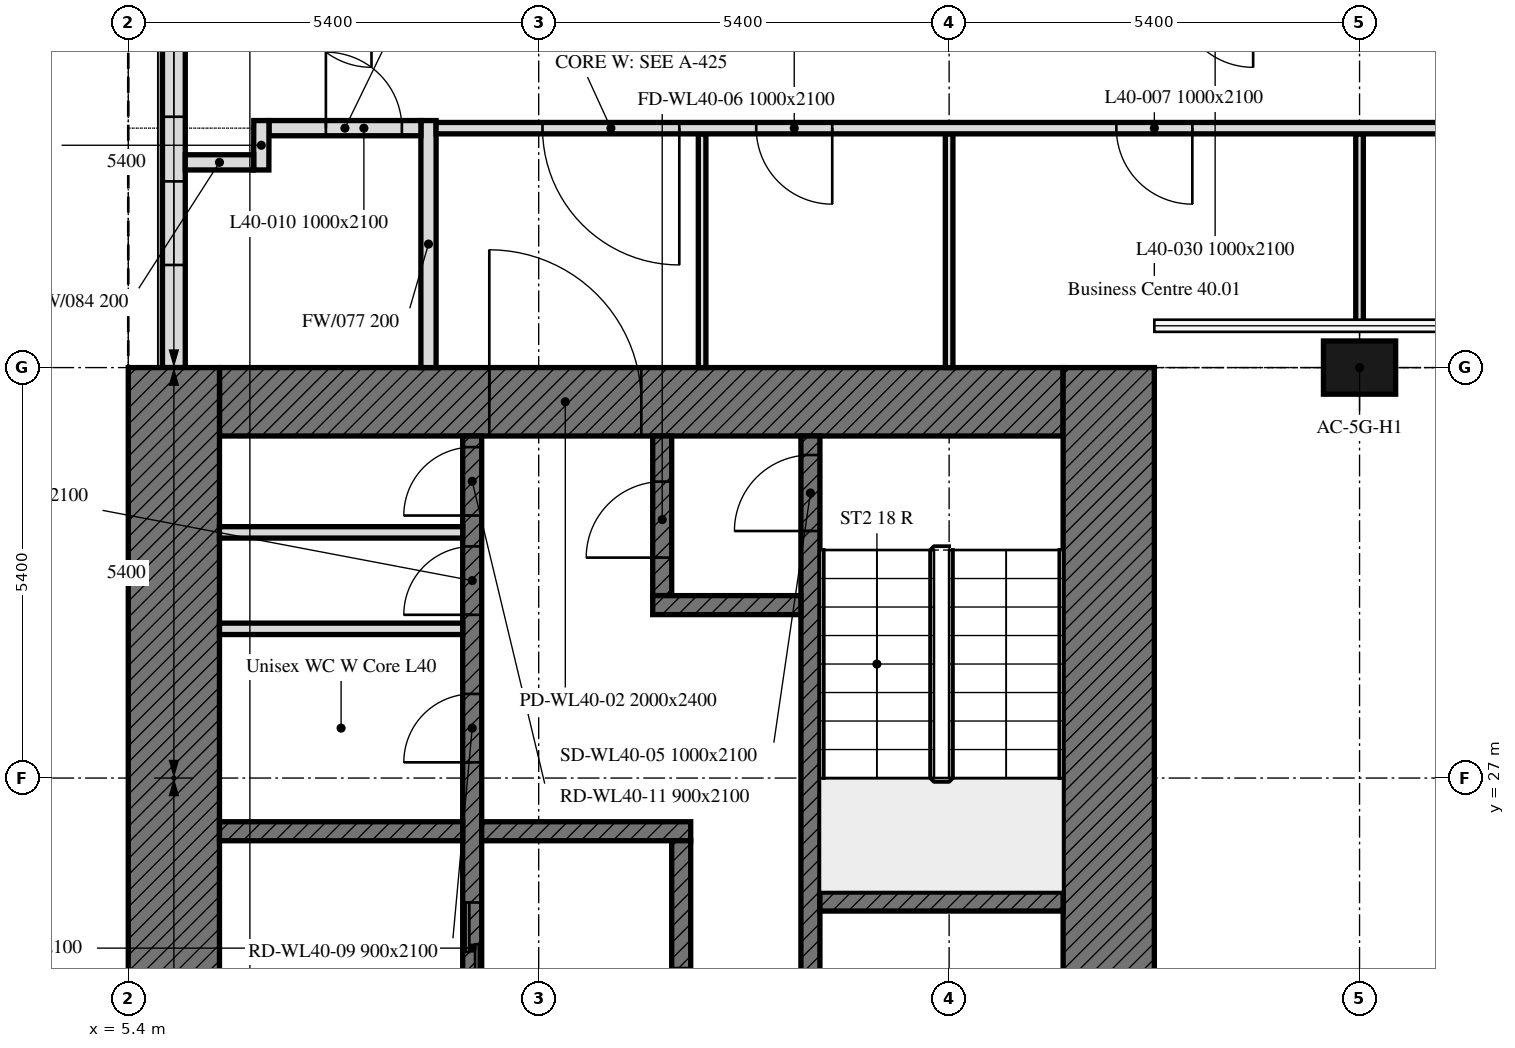
"""IFC4 building model, lengths in metres.
Left out: names, types, materials, properties, quantities, classifications, styles, units other than length and angle.
Written with IfcOpenShell. Run it as: python <this file> out.ifc"""

import sys

from ifc_helpers import new_model, si_unit, direction, frame, frame_2d, origin, origin_2d, place, context, subcontext, project, spatial, rectangle, extrude, element, fill, save


model = new_model("IFC4")
c1 = context("Model", 3, precision=1e-05, world=origin(), true_north=direction((0.0, 1.0)))
c2 = subcontext(c1, "Body", "Model", "MODEL_VIEW")
j1 = project(units=[si_unit("LENGTHUNIT", "METRE"), si_unit("PLANEANGLEUNIT", "RADIAN")], contexts=[c1])
p1 = place(None, origin())
s1 = spatial("IfcSite", under=j1, at=p1, CompositionType="ELEMENT")
p2 = place(p1, origin())
s2 = spatial("IfcBuilding", under=s1, at=p2, CompositionType="ELEMENT")
p3 = place(p2, frame((0.0, 0.0, 169.3)))
s3 = spatial("IfcBuildingStorey", under=s2, at=p3, CompositionType="ELEMENT", Elevation=169.3)
p4 = place(p3, frame((21.6, 32.4, 0.0), z_axis=(0.0, 0.0, 1.0), x_axis=(1.0, 0.0, 0.0)))
e1 = element("IfcColumn", 1, at=p4, inside=s3, PredefinedType="COLUMN", context=c2, shape_type="SweptSolid", body=[
    extrude(rectangle(XDim=0.95, YDim=0.7, at=origin_2d()), origin(), (0.0, 0.0, 1.0), 3.0),
])
p5 = place(p3, frame((6.0, 37.614, 0.0), z_axis=(0.0, 0.0, 1.0), x_axis=(0.0, -1.0, 0.0)))
e2 = element("IfcWall", 2, at=p5, inside=s3, PredefinedType="SOLIDWALL", context=c2, shape_type="SweptSolid", body=[
    extrude(rectangle(XDim=5.214, YDim=0.3, at=frame_2d((2.607, 0.0))), origin(), (0.0, 0.0, 1.0), 3.0),
])
p6 = place(p5, frame((0.814, 0.0, 0.9)))
e3 = element("IfcOpeningElement", 3, at=p6, cuts=e2, PredefinedType="OPENING", context=c2, shape_type="SweptSolid", body=[
    extrude(rectangle(XDim=1.1, YDim=1.7, at=frame_2d((0.55, 0.85))), frame((0.0, 0.16, 0.0), z_axis=(0.0, -1.0, 0.0), x_axis=(1.0, 0.0, 0.0)), (0.0, 0.0, 1.0), 0.32),
])
p7 = place(p5, frame((2.764, 0.0, 0.9)))
e4 = element("IfcOpeningElement", 4, at=p7, cuts=e2, PredefinedType="OPENING", context=c2, shape_type="SweptSolid", body=[
    extrude(rectangle(XDim=1.1, YDim=1.7, at=frame_2d((0.55, 0.85))), frame((0.0, 0.16, 0.0), z_axis=(0.0, -1.0, 0.0), x_axis=(1.0, 0.0, 0.0)), (0.0, 0.0, 1.0), 0.32),
])
p8 = place(p3, frame((6.6, 31.95, 0.0), z_axis=(0.0, 0.0, 1.0), x_axis=(1.0, 0.0, 0.0)))
e5 = element("IfcWall", 5, at=p8, inside=s3, PredefinedType="SOLIDWALL", context=c2, shape_type="SweptSolid", body=[
    extrude(rectangle(XDim=11.1, YDim=0.9, at=frame_2d((5.55, 0.0))), origin(), (0.0, 0.0, 1.0), 3.0),
])
p9 = place(p8, frame((3.55, 0.0, 0.0)))
e6 = element("IfcOpeningElement", 6, at=p9, cuts=e5, PredefinedType="OPENING", context=c2, shape_type="SweptSolid", body=[
    extrude(rectangle(XDim=2.0, YDim=2.4, at=frame_2d((1.0, 1.2))), frame((0.0, 0.45, 0.0), z_axis=(0.0, -1.0, 0.0), x_axis=(1.0, 0.0, 0.0)), (0.0, 0.0, 1.0), 0.9),
])
for number, where, z_axis, x_axis in (
    (7, (6.0, 16.2, 0.0), (0.0, 0.0, 1.0), (0.0, 1.0, 0.0)),
    (8, (18.3, 32.4, 0.0), (0.0, 0.0, 1.0), (0.0, -1.0, 0.0)),
):
    element("IfcWall", number, at=place(p3, frame(where, z_axis=z_axis, x_axis=x_axis)), inside=s3, PredefinedType="SOLIDWALL", context=c2, shape_type="SweptSolid", body=[
        extrude(rectangle(XDim=16.2, YDim=1.2, at=frame_2d((8.1, 0.0))), origin(), (0.0, 0.0, 1.0), 3.0),
    ])
p10 = place(p3, frame((9.925, 17.1, 0.0), z_axis=(0.0, 0.0, 1.0), x_axis=(0.0, 1.0, 0.0)))
e9 = element("IfcWall", 9, at=p10, inside=s3, PredefinedType="SOLIDWALL", context=c2, shape_type="SweptSolid", body=[
    extrude(rectangle(XDim=14.4, YDim=0.25, at=frame_2d((7.2, 0.0))), origin(), (0.0, 0.0, 1.0), 3.0),
])
p11 = place(p10, frame((4.6, 0.0, 0.0)))
e10 = element("IfcOpeningElement", 10, at=p11, cuts=e9, PredefinedType="OPENING", context=c2, shape_type="SweptSolid", body=[
    extrude(rectangle(XDim=1.0, YDim=2.1, at=frame_2d((0.5, 1.05))), frame((0.0, 0.125, 0.0), z_axis=(0.0, -1.0, 0.0), x_axis=(1.0, 0.0, 0.0)), (0.0, 0.0, 1.0), 0.25),
])
p12 = place(p10, frame((7.062, 0.0, 0.0)))
e11 = element("IfcOpeningElement", 11, at=p12, cuts=e9, PredefinedType="OPENING", context=c2, shape_type="SweptSolid", body=[
    extrude(rectangle(XDim=1.2, YDim=2.1, at=frame_2d((0.6, 1.05))), frame((0.0, 0.125, 0.0), z_axis=(0.0, -1.0, 0.0), x_axis=(1.0, 0.0, 0.0)), (0.0, 0.0, 1.0), 0.25),
])
p13 = place(p10, frame((10.106, 0.0, 0.0)))
e12 = element("IfcOpeningElement", 12, at=p13, cuts=e9, PredefinedType="OPENING", context=c2, shape_type="SweptSolid", body=[
    extrude(rectangle(XDim=0.9, YDim=2.1, at=frame_2d((0.45, 1.05))), frame((0.0, 0.125, 0.0), z_axis=(0.0, -1.0, 0.0), x_axis=(1.0, 0.0, 0.0)), (0.0, 0.0, 1.0), 0.25),
])
p14 = place(p10, frame((12.048, 0.0, 0.0)))
e13 = element("IfcOpeningElement", 13, at=p14, cuts=e9, PredefinedType="OPENING", context=c2, shape_type="SweptSolid", body=[
    extrude(rectangle(XDim=0.9, YDim=2.1, at=frame_2d((0.45, 1.05))), frame((0.0, 0.125, 0.0), z_axis=(0.0, -1.0, 0.0), x_axis=(1.0, 0.0, 0.0)), (0.0, 0.0, 1.0), 0.25),
])
p15 = place(p10, frame((13.354, 0.0, 0.0)))
e14 = element("IfcOpeningElement", 14, at=p15, cuts=e9, PredefinedType="OPENING", context=c2, shape_type="SweptSolid", body=[
    extrude(rectangle(XDim=0.9, YDim=2.1, at=frame_2d((0.45, 1.05))), frame((0.0, 0.125, 0.0), z_axis=(0.0, -1.0, 0.0), x_axis=(1.0, 0.0, 0.0)), (0.0, 0.0, 1.0), 0.25),
])
p16 = place(p3, frame((14.375, 17.1, 0.0), z_axis=(0.0, 0.0, 1.0), x_axis=(0.0, 1.0, 0.0)))
e15 = element("IfcWall", 15, at=p16, inside=s3, PredefinedType="SOLIDWALL", context=c2, shape_type="SweptSolid", body=[
    extrude(rectangle(XDim=14.4, YDim=0.25, at=frame_2d((7.2, 0.0))), origin(), (0.0, 0.0, 1.0), 3.0),
])
p17 = place(p16, frame((13.15, 0.0, 0.0)))
e16 = element("IfcOpeningElement", 16, at=p17, cuts=e15, PredefinedType="OPENING", context=c2, shape_type="SweptSolid", body=[
    extrude(rectangle(XDim=1.0, YDim=2.1, at=frame_2d((0.5, 1.05))), frame((0.0, 0.125, 0.0), z_axis=(0.0, -1.0, 0.0), x_axis=(1.0, 0.0, 0.0)), (0.0, 0.0, 1.0), 0.25),
])
p18 = place(p16, frame((0.6, 0.0, 0.0)))
e17 = element("IfcOpeningElement", 17, at=p18, cuts=e15, PredefinedType="OPENING", context=c2, shape_type="SweptSolid", body=[
    extrude(rectangle(XDim=1.1, YDim=2.1, at=frame_2d((0.55, 1.05))), frame((0.0, 0.125, 0.0), z_axis=(0.0, -1.0, 0.0), x_axis=(1.0, 0.0, 0.0)), (0.0, 0.0, 1.0), 0.25),
])
p19 = place(p16, frame((3.25, 0.0, 0.0)))
e18 = element("IfcOpeningElement", 18, at=p19, cuts=e15, PredefinedType="OPENING", context=c2, shape_type="SweptSolid", body=[
    extrude(rectangle(XDim=0.9, YDim=2.1, at=frame_2d((0.45, 1.05))), frame((0.0, 0.125, 0.0), z_axis=(0.0, -1.0, 0.0), x_axis=(1.0, 0.0, 0.0)), (0.0, 0.0, 1.0), 0.25),
])
for number, where, z_axis, x_axis in (
    (19, (14.5, 25.375, 0.0), (0.0, 0.0, 1.0), (1.0, 0.0, 0.0)),
    (20, (6.6, 26.3, 0.0), (0.0, 0.0, 1.0), (1.0, 0.0, 0.0)),
):
    element("IfcWall", number, at=place(p3, frame(where, z_axis=z_axis, x_axis=x_axis)), inside=s3, PredefinedType="SOLIDWALL", context=c2, shape_type="SweptSolid", body=[
        extrude(rectangle(XDim=3.2, YDim=0.25, at=frame_2d((1.6, 0.0))), origin(), (0.0, 0.0, 1.0), 3.0),
    ])
p20 = place(p3, frame((10.05, 26.3, 0.0), z_axis=(0.0, 0.0, 1.0), x_axis=(1.0, 0.0, 0.0)))
e21 = element("IfcWall", 21, at=p20, inside=s3, PredefinedType="SOLIDWALL", context=c2, shape_type="SweptSolid", body=[
    extrude(rectangle(XDim=2.75, YDim=0.25, at=frame_2d((1.375, 0.0))), origin(), (0.0, 0.0, 1.0), 3.0),
])
p21 = place(p3, frame((12.425, 29.4, 0.0), z_axis=(0.0, 0.0, 1.0), x_axis=(0.0, 1.0, 0.0)))
e22 = element("IfcWall", 22, at=p21, inside=s3, PredefinedType="SOLIDWALL", context=c2, shape_type="SweptSolid", body=[
    extrude(rectangle(XDim=2.1, YDim=0.25, at=frame_2d((1.05, 0.0))), origin(), (0.0, 0.0, 1.0), 3.0),
])
p22 = place(p21, frame((0.5, 0.0, 0.0)))
e23 = element("IfcOpeningElement", 23, at=p22, cuts=e22, PredefinedType="OPENING", context=c2, shape_type="SweptSolid", body=[
    extrude(rectangle(XDim=1.0, YDim=2.1, at=frame_2d((0.5, 1.05))), frame((0.0, 0.125, 0.0), z_axis=(0.0, -1.0, 0.0), x_axis=(1.0, 0.0, 0.0)), (0.0, 0.0, 1.0), 0.25),
])
p23 = place(p3, frame((12.3, 29.275, 0.0), z_axis=(0.0, 0.0, 1.0), x_axis=(1.0, 0.0, 0.0)))
e24 = element("IfcWall", 24, at=p23, inside=s3, PredefinedType="SOLIDWALL", context=c2, shape_type="SweptSolid", body=[
    extrude(rectangle(XDim=1.95, YDim=0.25, at=frame_2d((0.975, 0.0))), origin(), (0.0, 0.0, 1.0), 3.0),
])
p24 = place(p3, frame((12.675, 20.55, 0.0), z_axis=(0.0, 0.0, 1.0), x_axis=(0.0, 1.0, 0.0)))
e25 = element("IfcWall", 25, at=p24, inside=s3, PredefinedType="SOLIDWALL", context=c2, shape_type="SweptSolid", body=[
    extrude(rectangle(XDim=5.625, YDim=0.25, at=frame_2d((2.812, 0.0))), origin(), (0.0, 0.0, 1.0), 3.0),
])
p25 = place(p24, frame((2.95, 0.0, 0.0)))
e26 = element("IfcOpeningElement", 26, at=p25, cuts=e25, PredefinedType="OPENING", context=c2, shape_type="SweptSolid", body=[
    extrude(rectangle(XDim=1.0, YDim=2.1, at=frame_2d((0.5, 1.05))), frame((0.0, 0.125, 0.0), z_axis=(0.0, -1.0, 0.0), x_axis=(1.0, 0.0, 0.0)), (0.0, 0.0, 1.0), 0.25),
])
for number, where, z_axis, x_axis in (
    (27, (6.6, 28.963, 0.0), (0.0, 0.0, 1.0), (1.0, 0.0, 0.0)),
    (28, (6.6, 30.232, 0.0), (0.0, 0.0, 1.0), (1.0, 0.0, 0.0)),
):
    element("IfcWall", number, at=place(p3, frame(where, z_axis=z_axis, x_axis=x_axis)), inside=s3, PredefinedType="PARTITIONING", context=c2, shape_type="SweptSolid", body=[
        extrude(rectangle(XDim=3.2, YDim=0.15, at=frame_2d((1.6, 0.0))), origin(), (0.0, 0.0, 1.0), 3.0),
    ])
p26 = place(p3, frame((16.2, 35.475, 0.0), z_axis=(0.0, 0.0, 1.0), x_axis=(0.0, -1.0, 0.0)))
e29 = element("IfcWall", 29, at=p26, inside=s3, PredefinedType="PARTITIONING", context=c2, shape_type="SweptSolid", body=[
    extrude(rectangle(XDim=3.075, YDim=0.1, at=frame_2d((1.538, 0.0))), origin(), (0.0, 0.0, 1.0), 3.0),
])
p27 = place(p3, frame((21.6, 32.895, 0.0), z_axis=(0.0, 0.0, 1.0), x_axis=(0.0, 1.0, 0.0)))
e30 = element("IfcWall", 30, at=p27, inside=s3, PredefinedType="PARTITIONING", context=c2, shape_type="SweptSolid", body=[
    extrude(rectangle(XDim=2.58, YDim=0.1, at=frame_2d((1.29, 0.0))), origin(), (0.0, 0.0, 1.0), 3.0),
])
p28 = place(p3, frame((9.35, 35.65, 0.0), z_axis=(0.0, 0.0, 1.0), x_axis=(0.0, -1.0, 0.0)))
e31 = element("IfcWall", 31, at=p28, inside=s3, PredefinedType="PARTITIONING", context=c2, shape_type="SweptSolid", body=[
    extrude(rectangle(XDim=3.25, YDim=0.2, at=frame_2d((1.625, 0.0))), origin(), (0.0, 0.0, 1.0), 3.0),
])
p29 = place(p3, frame((12.95, 32.4, 0.0), z_axis=(0.0, 0.0, 1.0), x_axis=(0.0, 1.0, 0.0)))
e32 = element("IfcWall", 32, at=p29, inside=s3, PredefinedType="PARTITIONING", context=c2, shape_type="SweptSolid", body=[
    extrude(rectangle(XDim=3.075, YDim=0.1, at=frame_2d((1.538, 0.0))), origin(), (0.0, 0.0, 1.0), 3.0),
])
p30 = place(p3, frame((7.251, 35.55, 0.0), z_axis=(0.0, 0.0, 1.0), x_axis=(1.0, 0.0, 0.0)))
e33 = element("IfcWall", 33, at=p30, inside=s3, PredefinedType="PARTITIONING", context=c2, shape_type="SweptSolid", body=[
    extrude(rectangle(XDim=1.999, YDim=0.2, at=frame_2d((1.0, 0.0))), origin(), (0.0, 0.0, 1.0), 3.0),
])
p31 = place(p30, frame((0.749, 0.0, 0.0)))
e34 = element("IfcOpeningElement", 34, at=p31, cuts=e33, PredefinedType="OPENING", context=c2, shape_type="SweptSolid", body=[
    extrude(rectangle(XDim=1.0, YDim=2.1, at=frame_2d((0.5, 1.05))), frame((0.0, 0.1, 0.0), z_axis=(0.0, -1.0, 0.0), x_axis=(1.0, 0.0, 0.0)), (0.0, 0.0, 1.0), 0.2),
])
p32 = place(p3, frame((7.151, 35.65, 0.0), z_axis=(0.0, 0.0, 1.0), x_axis=(-0.001878283689, -0.999998236024, 0.0)))
e35 = element("IfcWall", 35, at=p32, inside=s3, PredefinedType="PARTITIONING", context=c2, shape_type="SweptSolid", body=[
    extrude(rectangle(XDim=0.65, YDim=0.2, at=frame_2d((0.325, 0.0))), origin(), (0.0, 0.0, 1.0), 3.0),
])
p33 = place(p3, frame((7.05, 35.1, 0.0), z_axis=(0.0, 0.0, 1.0), x_axis=(-1.0, 0.0, 0.0)))
e36 = element("IfcWall", 36, at=p33, inside=s3, PredefinedType="PARTITIONING", context=c2, shape_type="SweptSolid", body=[
    extrude(rectangle(XDim=0.9, YDim=0.2, at=frame_2d((0.45, 0.0))), origin(), (0.0, 0.0, 1.0), 3.0),
])
p34 = place(p3, frame((43.275, 35.55, 0.0), z_axis=(0.0, 0.0, 1.0), x_axis=(-1.0, 0.0, 0.0)))
e37 = element("IfcWall", 37, at=p34, inside=s3, PredefinedType="PARTITIONING", context=c2, shape_type="SweptSolid", body=[
    extrude(rectangle(XDim=33.825, YDim=0.15, at=frame_2d((16.913, 0.0))), origin(), (0.0, 0.0, 1.0), 3.0),
])
p35 = place(p34, frame((23.875, 0.0, 0.0)))
e38 = element("IfcOpeningElement", 38, at=p35, cuts=e37, PredefinedType="OPENING", context=c2, shape_type="SweptSolid", body=[
    extrude(rectangle(XDim=1.0, YDim=2.1, at=frame_2d((0.5, 1.05))), frame((0.0, 0.075, 0.0), z_axis=(0.0, -1.0, 0.0), x_axis=(1.0, 0.0, 0.0)), (0.0, 0.0, 1.0), 0.15),
])
p36 = place(p34, frame((13.475, 0.0, 0.0)))
e39 = element("IfcOpeningElement", 39, at=p36, cuts=e37, PredefinedType="OPENING", context=c2, shape_type="SweptSolid", body=[
    extrude(rectangle(XDim=1.0, YDim=2.1, at=frame_2d((0.5, 1.05))), frame((0.0, 0.075, 0.0), z_axis=(0.0, -1.0, 0.0), x_axis=(1.0, 0.0, 0.0)), (0.0, 0.0, 1.0), 0.15),
])
p37 = place(p34, frame((8.337, 0.0, 0.0)))
e40 = element("IfcOpeningElement", 40, at=p37, cuts=e37, PredefinedType="OPENING", context=c2, shape_type="SweptSolid", body=[
    extrude(rectangle(XDim=1.0, YDim=2.1, at=frame_2d((0.5, 1.05))), frame((0.0, 0.075, 0.0), z_axis=(0.0, -1.0, 0.0), x_axis=(1.0, 0.0, 0.0)), (0.0, 0.0, 1.0), 0.15),
])
p38 = place(p34, frame((1.648, 0.0, 0.0)))
e41 = element("IfcOpeningElement", 41, at=p38, cuts=e37, PredefinedType="OPENING", context=c2, shape_type="SweptSolid", body=[
    extrude(rectangle(XDim=1.0, YDim=2.1, at=frame_2d((0.5, 1.05))), frame((0.0, 0.075, 0.0), z_axis=(0.0, -1.0, 0.0), x_axis=(1.0, 0.0, 0.0)), (0.0, 0.0, 1.0), 0.15),
])
p39 = place(p34, frame((28.613, 0.0, 0.0)))
e42 = element("IfcOpeningElement", 42, at=p39, cuts=e37, PredefinedType="OPENING", context=c2, shape_type="SweptSolid", body=[
    extrude(rectangle(XDim=1.0, YDim=2.1, at=frame_2d((0.5, 1.05))), frame((0.0, 0.075, 0.0), z_axis=(0.0, -1.0, 0.0), x_axis=(1.0, 0.0, 0.0)), (0.0, 0.0, 1.0), 0.15),
])
p40 = place(p34, frame((30.625, 0.0, 0.0)))
e43 = element("IfcOpeningElement", 43, at=p40, cuts=e37, PredefinedType="OPENING", context=c2, shape_type="SweptSolid", body=[
    extrude(rectangle(XDim=1.8, YDim=2.4, at=frame_2d((0.9, 1.2))), frame((0.0, 0.075, 0.0), z_axis=(0.0, -1.0, 0.0), x_axis=(1.0, 0.0, 0.0)), (0.0, 0.0, 1.0), 0.15),
])
p41 = place(p34, frame((5.525, 0.0, 0.0)))
e44 = element("IfcOpeningElement", 44, at=p41, cuts=e37, PredefinedType="OPENING", context=c2, shape_type="SweptSolid", body=[
    extrude(rectangle(XDim=1.8, YDim=2.4, at=frame_2d((0.9, 1.2))), frame((0.0, 0.075, 0.0), z_axis=(0.0, -1.0, 0.0), x_axis=(1.0, 0.0, 0.0)), (0.0, 0.0, 1.0), 0.15),
])
p42 = place(p6, origin())
e45 = element("IfcWindow", 45, at=p42, inside=s3, PartitioningType="SINGLE_PANEL", PredefinedType="WINDOW", context=c2, shape_type="SweptSolid", body=[
    extrude(rectangle(XDim=1.1, YDim=1.7, at=frame_2d((0.55, 0.85))), frame((0.0, 0.03, 0.0), z_axis=(0.0, -1.0, 0.0), x_axis=(1.0, 0.0, 0.0)), (0.0, 0.0, 1.0), 0.06),
])
fill(e3, e45)
p43 = place(p7, origin())
e46 = element("IfcWindow", 46, at=p43, inside=s3, PartitioningType="SINGLE_PANEL", PredefinedType="WINDOW", context=c2, shape_type="SweptSolid", body=[
    extrude(rectangle(XDim=1.1, YDim=1.7, at=frame_2d((0.55, 0.85))), frame((0.0, 0.03, 0.0), z_axis=(0.0, -1.0, 0.0), x_axis=(1.0, 0.0, 0.0)), (0.0, 0.0, 1.0), 0.06),
])
fill(e4, e46)
p44 = place(p9, origin())
e47 = element("IfcDoor", 47, at=p44, inside=s3, OperationType="DOUBLE_DOOR_SINGLE_SWING", PredefinedType="DOOR", context=c2, shape_type="SweptSolid", body=[
    extrude(rectangle(XDim=2.0, YDim=2.4, at=frame_2d((1.0, 1.2))), frame((0.0, 0.025, 0.0), z_axis=(0.0, -1.0, 0.0), x_axis=(1.0, 0.0, 0.0)), (0.0, 0.0, 1.0), 0.05),
])
fill(e6, e47)
p45 = place(p17, origin())
e48 = element("IfcDoor", 48, at=p45, inside=s3, OperationType="SINGLE_SWING_LEFT", PredefinedType="DOOR", context=c2, shape_type="SweptSolid", body=[
    extrude(rectangle(XDim=1.0, YDim=2.1, at=frame_2d((0.5, 1.05))), frame((0.0, 0.025, 0.0), z_axis=(0.0, -1.0, 0.0), x_axis=(1.0, 0.0, 0.0)), (0.0, 0.0, 1.0), 0.05),
])
fill(e16, e48)
p46 = place(p22, origin())
e49 = element("IfcDoor", 49, at=p46, inside=s3, OperationType="SINGLE_SWING_LEFT", PredefinedType="DOOR", context=c2, shape_type="SweptSolid", body=[
    extrude(rectangle(XDim=1.0, YDim=2.1, at=frame_2d((0.5, 1.05))), frame((0.0, 0.025, 0.0), z_axis=(0.0, -1.0, 0.0), x_axis=(1.0, 0.0, 0.0)), (0.0, 0.0, 1.0), 0.05),
])
fill(e23, e49)
p47 = place(p12, origin())
e50 = element("IfcDoor", 50, at=p47, inside=s3, OperationType="DOUBLE_DOOR_SLIDING", PredefinedType="DOOR", context=c2, shape_type="SweptSolid", body=[
    extrude(rectangle(XDim=1.2, YDim=2.1, at=frame_2d((0.6, 1.05))), frame((0.0, 0.025, 0.0), z_axis=(0.0, -1.0, 0.0), x_axis=(1.0, 0.0, 0.0)), (0.0, 0.0, 1.0), 0.05),
])
fill(e11, e50)
p48 = place(p13, origin())
e51 = element("IfcDoor", 51, at=p48, inside=s3, OperationType="SINGLE_SWING_LEFT", PredefinedType="DOOR", context=c2, shape_type="SweptSolid", body=[
    extrude(rectangle(XDim=0.9, YDim=2.1, at=frame_2d((0.45, 1.05))), frame((0.0, 0.025, 0.0), z_axis=(0.0, -1.0, 0.0), x_axis=(1.0, 0.0, 0.0)), (0.0, 0.0, 1.0), 0.05),
])
fill(e12, e51)
p49 = place(p14, origin())
e52 = element("IfcDoor", 52, at=p49, inside=s3, OperationType="SINGLE_SWING_LEFT", PredefinedType="DOOR", context=c2, shape_type="SweptSolid", body=[
    extrude(rectangle(XDim=0.9, YDim=2.1, at=frame_2d((0.45, 1.05))), frame((0.0, 0.025, 0.0), z_axis=(0.0, -1.0, 0.0), x_axis=(1.0, 0.0, 0.0)), (0.0, 0.0, 1.0), 0.05),
])
fill(e13, e52)
p50 = place(p15, origin())
e53 = element("IfcDoor", 53, at=p50, inside=s3, OperationType="SINGLE_SWING_LEFT", PredefinedType="DOOR", context=c2, shape_type="SweptSolid", body=[
    extrude(rectangle(XDim=0.9, YDim=2.1, at=frame_2d((0.45, 1.05))), frame((0.0, 0.025, 0.0), z_axis=(0.0, -1.0, 0.0), x_axis=(1.0, 0.0, 0.0)), (0.0, 0.0, 1.0), 0.05),
])
fill(e14, e53)
p51 = place(p35, origin())
e54 = element("IfcDoor", 54, at=p51, inside=s3, OperationType="SINGLE_SWING_LEFT", PredefinedType="DOOR", context=c2, shape_type="SweptSolid", body=[
    extrude(rectangle(XDim=1.0, YDim=2.1, at=frame_2d((0.5, 1.05))), frame((0.0, 0.025, 0.0), z_axis=(0.0, -1.0, 0.0), x_axis=(1.0, 0.0, 0.0)), (0.0, 0.0, 1.0), 0.05),
])
fill(e38, e54)
p52 = place(p31, origin())
e55 = element("IfcDoor", 55, at=p52, inside=s3, OperationType="SINGLE_SWING_RIGHT", PredefinedType="DOOR", context=c2, shape_type="SweptSolid", body=[
    extrude(rectangle(XDim=1.0, YDim=2.1, at=frame_2d((0.5, 1.05))), frame((0.0, 0.025, 0.0), z_axis=(0.0, -1.0, 0.0), x_axis=(1.0, 0.0, 0.0)), (0.0, 0.0, 1.0), 0.05),
])
fill(e34, e55)
p53 = place(p39, origin())
e56 = element("IfcDoor", 56, at=p53, inside=s3, OperationType="SINGLE_SWING_LEFT", PredefinedType="DOOR", context=c2, shape_type="SweptSolid", body=[
    extrude(rectangle(XDim=1.0, YDim=2.1, at=frame_2d((0.5, 1.05))), frame((0.0, 0.025, 0.0), z_axis=(0.0, -1.0, 0.0), x_axis=(1.0, 0.0, 0.0)), (0.0, 0.0, 1.0), 0.05),
])
fill(e42, e56)
p54 = place(p40, origin())
e57 = element("IfcDoor", 57, at=p54, inside=s3, OperationType="DOUBLE_DOOR_SINGLE_SWING", PredefinedType="DOOR", context=c2, shape_type="SweptSolid", body=[
    extrude(rectangle(XDim=1.8, YDim=2.4, at=frame_2d((0.9, 1.2))), frame((0.0, 0.025, 0.0), z_axis=(0.0, -1.0, 0.0), x_axis=(1.0, 0.0, 0.0)), (0.0, 0.0, 1.0), 0.05),
])
fill(e43, e57)
save(model, sys.argv[1])
